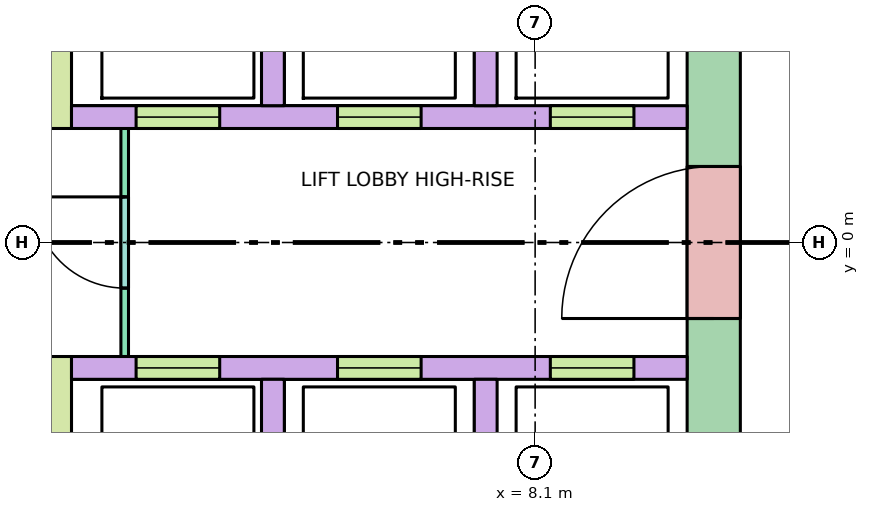
"""IFC4 building model, lengths in metres.
Left out: names, types, materials, properties, quantities, classifications, styles, units other than length and angle.
Written with IfcOpenShell. Run it as: python <this file> out.ifc"""

import sys

from ifc_helpers import new_model, si_unit, direction, frame, frame_2d, origin, place, context, subcontext, project, spatial, rectangle, extrude, element, fill, save


model = new_model("IFC4")
c1 = context("Model", 3, precision=1e-05, world=origin(), true_north=direction((0.0, 1.0)))
c2 = subcontext(c1, "Body", "Model", "MODEL_VIEW")
j1 = project(units=[si_unit("LENGTHUNIT", "METRE"), si_unit("PLANEANGLEUNIT", "RADIAN")], contexts=[c1])
p1 = place(None, origin())
s1 = spatial("IfcSite", under=j1, at=p1, CompositionType="ELEMENT")
p2 = place(p1, origin())
s2 = spatial("IfcBuilding", under=s1, at=p2, CompositionType="ELEMENT")
p3 = place(p2, frame((0.0, 0.0, 211.3)))
s3 = spatial("IfcBuildingStorey", under=s2, at=p3, CompositionType="ELEMENT", Elevation=211.3)
p4 = place(p3, frame((10.45, -5.13, -0.28), z_axis=(0.0, 0.0, 1.0), x_axis=(0.0, 1.0, 0.0)))
e1 = element("IfcWall", 1, at=p4, inside=s3, PredefinedType="SHEAR", context=c2, shape_type="SweptSolid", body=[
    extrude(rectangle(XDim=10.26, YDim=0.7, at=frame_2d((5.13, 0.0))), origin(), (0.0, 0.0, 1.0), 3.7),
])
p5 = place(p4, frame((4.13, 0.0, 0.28)))
e2 = element("IfcOpeningElement", 2, at=p5, cuts=e1, PredefinedType="OPENING", context=c2, shape_type="SweptSolid", body=[
    extrude(rectangle(XDim=2.0, YDim=2.1, at=frame_2d((1.0, 1.05))), frame((0.0, 0.36, 0.0), z_axis=(0.0, -1.0, 0.0), x_axis=(1.0, 0.0, 0.0)), (0.0, 0.0, 1.0), 0.72),
])
p6 = place(p3, frame((2.0, 1.65, 0.0), z_axis=(0.0, 0.0, 1.0), x_axis=(1.0, 0.0, 0.0)))
e3 = element("IfcWall", 3, at=p6, inside=s3, PredefinedType="SOLIDWALL", context=c2, shape_type="SweptSolid", body=[
    extrude(rectangle(XDim=8.1, YDim=0.3, at=frame_2d((4.05, 0.0))), origin(), (0.0, 0.0, 1.0), 3.42),
])
p7 = place(p6, frame((0.85, 0.0, 0.0)))
e4 = element("IfcOpeningElement", 4, at=p7, cuts=e3, PredefinedType="OPENING", context=c2, shape_type="SweptSolid", body=[
    extrude(rectangle(XDim=1.1, YDim=2.1, at=frame_2d((0.55, 1.05))), frame((0.0, 0.16, 0.0), z_axis=(0.0, -1.0, 0.0), x_axis=(1.0, 0.0, 0.0)), (0.0, 0.0, 1.0), 0.32),
])
p8 = place(p6, frame((3.5, 0.0, 0.0)))
e5 = element("IfcOpeningElement", 5, at=p8, cuts=e3, PredefinedType="OPENING", context=c2, shape_type="SweptSolid", body=[
    extrude(rectangle(XDim=1.1, YDim=2.1, at=frame_2d((0.55, 1.05))), frame((0.0, 0.16, 0.0), z_axis=(0.0, -1.0, 0.0), x_axis=(1.0, 0.0, 0.0)), (0.0, 0.0, 1.0), 0.32),
])
p9 = place(p6, frame((6.3, 0.0, 0.0)))
e6 = element("IfcOpeningElement", 6, at=p9, cuts=e3, PredefinedType="OPENING", context=c2, shape_type="SweptSolid", body=[
    extrude(rectangle(XDim=1.1, YDim=2.1, at=frame_2d((0.55, 1.05))), frame((0.0, 0.16, 0.0), z_axis=(0.0, -1.0, 0.0), x_axis=(1.0, 0.0, 0.0)), (0.0, 0.0, 1.0), 0.32),
])
p10 = place(p3, frame((2.0, -1.65, 0.0), z_axis=(0.0, 0.0, 1.0), x_axis=(1.0, 0.0, 0.0)))
e7 = element("IfcWall", 7, at=p10, inside=s3, PredefinedType="SOLIDWALL", context=c2, shape_type="SweptSolid", body=[
    extrude(rectangle(XDim=8.1, YDim=0.3, at=frame_2d((4.05, 0.0))), origin(), (0.0, 0.0, 1.0), 3.42),
])
p11 = place(p10, frame((0.85, 0.0, 0.0)))
e8 = element("IfcOpeningElement", 8, at=p11, cuts=e7, PredefinedType="OPENING", context=c2, shape_type="SweptSolid", body=[
    extrude(rectangle(XDim=1.1, YDim=2.1, at=frame_2d((0.55, 1.05))), frame((0.0, 0.16, 0.0), z_axis=(0.0, -1.0, 0.0), x_axis=(1.0, 0.0, 0.0)), (0.0, 0.0, 1.0), 0.32),
])
p12 = place(p10, frame((3.5, 0.0, 0.0)))
e9 = element("IfcOpeningElement", 9, at=p12, cuts=e7, PredefinedType="OPENING", context=c2, shape_type="SweptSolid", body=[
    extrude(rectangle(XDim=1.1, YDim=2.1, at=frame_2d((0.55, 1.05))), frame((0.0, 0.16, 0.0), z_axis=(0.0, -1.0, 0.0), x_axis=(1.0, 0.0, 0.0)), (0.0, 0.0, 1.0), 0.32),
])
p13 = place(p10, frame((6.3, 0.0, 0.0)))
e10 = element("IfcOpeningElement", 10, at=p13, cuts=e7, PredefinedType="OPENING", context=c2, shape_type="SweptSolid", body=[
    extrude(rectangle(XDim=1.1, YDim=2.1, at=frame_2d((0.55, 1.05))), frame((0.0, 0.16, 0.0), z_axis=(0.0, -1.0, 0.0), x_axis=(1.0, 0.0, 0.0)), (0.0, 0.0, 1.0), 0.32),
])
for number, where, z_axis, x_axis in (
    (11, (4.65, 1.8, 0.0), (0.0, 0.0, 1.0), (0.0, 1.0, 0.0)),
    (12, (4.65, -4.2, 0.0), (0.0, 0.0, 1.0), (0.0, 1.0, 0.0)),
    (13, (7.45, 1.8, 0.0), (0.0, 0.0, 1.0), (0.0, 1.0, 0.0)),
    (14, (7.45, -4.2, 0.0), (0.0, 0.0, 1.0), (0.0, 1.0, 0.0)),
):
    element("IfcWall", number, at=place(p3, frame(where, z_axis=z_axis, x_axis=x_axis)), inside=s3, PredefinedType="SOLIDWALL", context=c2, shape_type="SweptSolid", body=[
        extrude(rectangle(XDim=2.4, YDim=0.3, at=frame_2d((1.2, 0.0))), origin(), (0.0, 0.0, 1.0), 3.42),
    ])
for number, where, z_axis, x_axis in (
    (15, (1.85, 1.5, 0.0), (0.0, 0.0, 1.0), (0.0, 1.0, 0.0)),
    (16, (1.85, -8.1, 0.0), (0.0, 0.0, 1.0), (0.0, 1.0, 0.0)),
):
    element("IfcWall", number, at=place(p3, frame(where, z_axis=z_axis, x_axis=x_axis)), inside=s3, PredefinedType="SHEAR", context=c2, shape_type="SweptSolid", body=[
        extrude(rectangle(XDim=6.6, YDim=0.3, at=frame_2d((3.3, 0.0))), origin(), (0.0, 0.0, 1.0), 3.42),
    ])
p14 = place(p3, frame((2.7, -1.5, 0.0), z_axis=(0.0, 0.0, 1.0), x_axis=(0.0, 1.0, 0.0)))
e17 = element("IfcWall", 17, at=p14, inside=s3, PredefinedType="PARTITIONING", context=c2, shape_type="SweptSolid", body=[
    extrude(rectangle(XDim=3.0, YDim=0.1, at=frame_2d((1.5, 0.0))), origin(), (0.0, 0.0, 1.0), 3.42),
])
p15 = place(p14, frame((0.9, 0.0, 0.0)))
e18 = element("IfcOpeningElement", 18, at=p15, cuts=e17, PredefinedType="OPENING", context=c2, shape_type="SweptSolid", body=[
    extrude(rectangle(XDim=1.2, YDim=2.1, at=frame_2d((0.6, 1.05))), frame((0.0, 0.06, 0.0), z_axis=(0.0, -1.0, 0.0), x_axis=(1.0, 0.0, 0.0)), (0.0, 0.0, 1.0), 0.12),
])
p16 = place(p7, origin())
e19 = element("IfcDoor", 19, at=p16, inside=s3, OperationType="DOUBLE_DOOR_SLIDING", PredefinedType="DOOR", context=c2, shape_type="SweptSolid", body=[
    extrude(rectangle(XDim=1.1, YDim=2.1, at=frame_2d((0.55, 1.05))), frame((0.0, 0.025, 0.0), z_axis=(0.0, -1.0, 0.0), x_axis=(1.0, 0.0, 0.0)), (0.0, 0.0, 1.0), 0.05),
])
fill(e4, e19)
p17 = place(p8, origin())
e20 = element("IfcDoor", 20, at=p17, inside=s3, OperationType="DOUBLE_DOOR_SLIDING", PredefinedType="DOOR", context=c2, shape_type="SweptSolid", body=[
    extrude(rectangle(XDim=1.1, YDim=2.1, at=frame_2d((0.55, 1.05))), frame((0.0, 0.025, 0.0), z_axis=(0.0, -1.0, 0.0), x_axis=(1.0, 0.0, 0.0)), (0.0, 0.0, 1.0), 0.05),
])
fill(e5, e20)
p18 = place(p9, origin())
e21 = element("IfcDoor", 21, at=p18, inside=s3, OperationType="DOUBLE_DOOR_SLIDING", PredefinedType="DOOR", context=c2, shape_type="SweptSolid", body=[
    extrude(rectangle(XDim=1.1, YDim=2.1, at=frame_2d((0.55, 1.05))), frame((0.0, 0.025, 0.0), z_axis=(0.0, -1.0, 0.0), x_axis=(1.0, 0.0, 0.0)), (0.0, 0.0, 1.0), 0.05),
])
fill(e6, e21)
p19 = place(p11, origin())
e22 = element("IfcDoor", 22, at=p19, inside=s3, OperationType="DOUBLE_DOOR_SLIDING", PredefinedType="DOOR", context=c2, shape_type="SweptSolid", body=[
    extrude(rectangle(XDim=1.1, YDim=2.1, at=frame_2d((0.55, 1.05))), frame((0.0, 0.025, 0.0), z_axis=(0.0, -1.0, 0.0), x_axis=(1.0, 0.0, 0.0)), (0.0, 0.0, 1.0), 0.05),
])
fill(e8, e22)
p20 = place(p12, origin())
e23 = element("IfcDoor", 23, at=p20, inside=s3, OperationType="DOUBLE_DOOR_SLIDING", PredefinedType="DOOR", context=c2, shape_type="SweptSolid", body=[
    extrude(rectangle(XDim=1.1, YDim=2.1, at=frame_2d((0.55, 1.05))), frame((0.0, 0.025, 0.0), z_axis=(0.0, -1.0, 0.0), x_axis=(1.0, 0.0, 0.0)), (0.0, 0.0, 1.0), 0.05),
])
fill(e9, e23)
p21 = place(p13, origin())
e24 = element("IfcDoor", 24, at=p21, inside=s3, OperationType="DOUBLE_DOOR_SLIDING", PredefinedType="DOOR", context=c2, shape_type="SweptSolid", body=[
    extrude(rectangle(XDim=1.1, YDim=2.1, at=frame_2d((0.55, 1.05))), frame((0.0, 0.025, 0.0), z_axis=(0.0, -1.0, 0.0), x_axis=(1.0, 0.0, 0.0)), (0.0, 0.0, 1.0), 0.05),
])
fill(e10, e24)
p22 = place(p5, origin())
e25 = element("IfcDoor", 25, at=p22, inside=s3, OperationType="DOUBLE_DOOR_SINGLE_SWING", PredefinedType="DOOR", context=c2, shape_type="SweptSolid", body=[
    extrude(rectangle(XDim=2.0, YDim=2.1, at=frame_2d((1.0, 1.05))), frame((0.0, 0.025, 0.0), z_axis=(0.0, -1.0, 0.0), x_axis=(1.0, 0.0, 0.0)), (0.0, 0.0, 1.0), 0.05),
])
fill(e2, e25)
p23 = place(p15, origin())
e26 = element("IfcDoor", 26, at=p23, inside=s3, OperationType="SINGLE_SWING_RIGHT", PredefinedType="DOOR", context=c2, shape_type="SweptSolid", body=[
    extrude(rectangle(XDim=1.2, YDim=2.1, at=frame_2d((0.6, 1.05))), frame((0.0, 0.025, 0.0), z_axis=(0.0, -1.0, 0.0), x_axis=(1.0, 0.0, 0.0)), (0.0, 0.0, 1.0), 0.05),
])
fill(e18, e26)
save(model, sys.argv[1])
